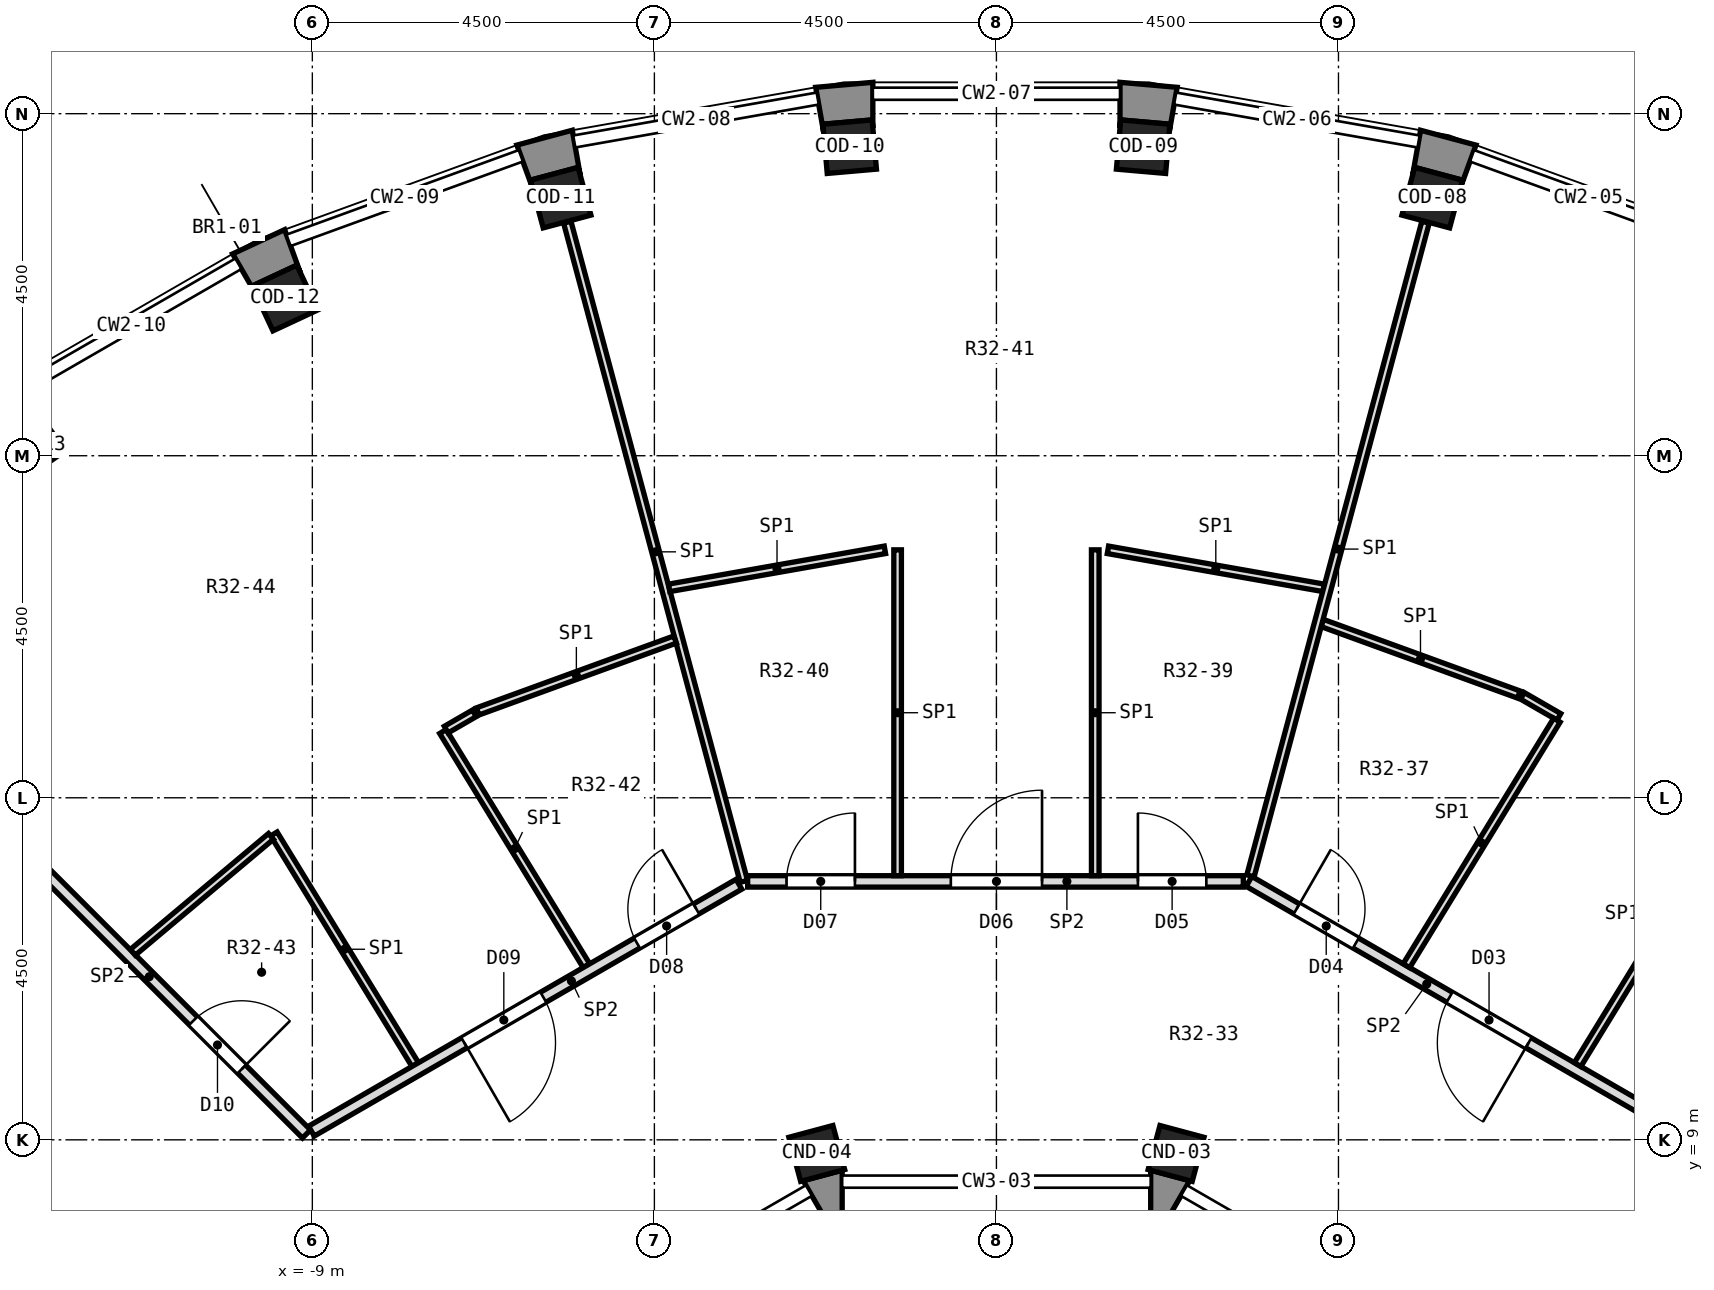
"""IFC4 building model, lengths in metres.
Left out: names, types, materials, properties, quantities, classifications, styles, units other than length and angle.
Written with IfcOpenShell. Run it as: python <this file> out.ifc"""

import sys

from ifc_helpers import new_model, si_unit, direction, frame, frame_2d, origin, origin_2d, place, context, subcontext, project, spatial, polyline, rectangle, outline, extrude, element, fill, save


model = new_model("IFC4")
c1 = context("Model", 3, precision=1e-05, world=origin(), true_north=direction((0.0, 1.0)))
c2 = subcontext(c1, "Body", "Model", "MODEL_VIEW")
j1 = project(units=[si_unit("LENGTHUNIT", "METRE"), si_unit("PLANEANGLEUNIT", "RADIAN")], contexts=[c1])
p1 = place(None, origin())
s1 = spatial("IfcSite", under=j1, at=p1, CompositionType="ELEMENT")
p2 = place(p1, origin())
s2 = spatial("IfcBuilding", under=s1, at=p2, CompositionType="ELEMENT")
p3 = place(p2, frame((0.0, 0.0, 224.7)))
s3 = spatial("IfcBuildingStorey", under=s2, at=p3, CompositionType="ELEMENT", Elevation=224.7)
for number, where, z_axis, x_axis in (
    (1, (5.733, 21.395, -0.55), (0.0, 0.0, 1.0), (0.259, 0.966, 0.0)),
    (2, (1.93, 22.066, -0.55), (0.0, 0.0, 1.0), (0.087, 0.996, 0.0)),
    (3, (-1.93, 22.066, -0.55), (0.0, 0.0, 1.0), (-0.087, 0.996, 0.0)),
    (4, (-5.733, 21.395, -0.55), (0.0, 0.0, 1.0), (-0.259, 0.966, 0.0)),
    (5, (-9.361, 20.075, -0.55), (0.0, 0.0, 1.0), (-0.423, 0.906, 0.0)),
    (6, (-12.705, 18.144, -0.55), (0.0, 0.0, 1.0), (-0.574, 0.819, 0.0)),
):
    element("IfcColumn", number, at=place(p3, frame(where, z_axis=z_axis, x_axis=x_axis)), inside=s3, PredefinedType="COLUMN", context=c2, shape_type="SweptSolid", body=[
        extrude(rectangle(XDim=0.65, YDim=0.65, at=origin_2d()), origin(), (0.0, 0.0, 1.0), 5.55),
    ])
for number, where, z_axis, x_axis in (
    (7, (2.364, 8.821, 0.0), (0.0, 0.0, 1.0), (0.259, 0.966, 0.0)),
    (8, (-2.364, 8.821, 0.0), (0.0, 0.0, 1.0), (-0.259, 0.966, 0.0)),
):
    element("IfcColumn", number, at=place(p3, frame(where, z_axis=z_axis, x_axis=x_axis)), inside=s3, PredefinedType="COLUMN", context=c2, shape_type="SweptSolid", body=[
        extrude(rectangle(XDim=0.6, YDim=0.6, at=origin_2d()), origin(), (0.0, 0.0, 1.0), 5.0),
    ])
p4 = place(p3, origin())
e9 = element("IfcWall", 9, at=p4, inside=s3, PredefinedType="SOLIDWALL", context=c2, shape_type="SweptSolid", body=[
    extrude(outline(polyline([(5.58, 22.282), (5.476, 21.691), (5.503, 21.793), (6.131, 21.625), (6.104, 21.523), (6.309, 22.087), (5.58, 22.282)])), origin(), (0.0, 0.0, 1.0), 4.6),
])
p5 = place(p3, origin())
e10 = element("IfcWall", 10, at=p5, inside=s3, PredefinedType="SOLIDWALL", context=c2, shape_type="SweptSolid", body=[
    extrude(outline(polyline([(2.378, 22.847), (1.626, 22.913), (1.626, 22.312), (1.635, 22.418), (2.283, 22.361), (2.273, 22.256), (2.378, 22.847)])), origin(), (0.0, 0.0, 1.0), 4.6),
])
p6 = place(p3, origin())
e11 = element("IfcWall", 11, at=p6, inside=s3, PredefinedType="SOLIDWALL", context=c2, shape_type="SweptSolid", body=[
    extrude(outline(polyline([(-1.626, 22.913), (-2.378, 22.847), (-2.273, 22.256), (-2.283, 22.361), (-1.635, 22.418), (-1.626, 22.312), (-1.626, 22.913)])), origin(), (0.0, 0.0, 1.0), 4.6),
])
p7 = place(p3, origin())
e12 = element("IfcWall", 12, at=p7, inside=s3, PredefinedType="SOLIDWALL", context=c2, shape_type="SweptSolid", body=[
    extrude(outline(polyline([(-6.309, 22.087), (-6.104, 21.523), (-6.131, 21.625), (-5.503, 21.793), (-5.476, 21.691), (-5.58, 22.282), (-6.309, 22.087)])), origin(), (0.0, 0.0, 1.0), 4.6),
])
p8 = place(p3, origin())
e13 = element("IfcWall", 13, at=p8, inside=s3, PredefinedType="SOLIDWALL", context=c2, shape_type="SweptSolid", body=[
    extrude(outline(polyline([(-9.364, 20.975), (-10.048, 20.656), (-9.748, 20.136), (-9.793, 20.232), (-9.204, 20.507), (-9.159, 20.411), (-9.364, 20.975)])), origin(), (0.0, 0.0, 1.0), 4.6),
])
p9 = place(p3, origin())
e14 = element("IfcWall", 14, at=p9, inside=s3, PredefinedType="SOLIDWALL", context=c2, shape_type="SweptSolid", body=[
    extrude(outline(polyline([(2.029, 8.6), (2.029, 8.0), (2.242, 7.943), (2.542, 8.462), (2.029, 8.6)])), origin(), (0.0, 0.0, 1.0), 4.6),
])
p10 = place(p3, origin())
e15 = element("IfcWall", 15, at=p10, inside=s3, PredefinedType="SOLIDWALL", context=c2, shape_type="SweptSolid", body=[
    extrude(outline(polyline([(-2.542, 8.462), (-2.242, 7.943), (-2.029, 8.0), (-2.029, 8.6), (-2.542, 8.462)])), origin(), (0.0, 0.0, 1.0), 4.6),
])
p11 = place(p3, frame((-5.646, 21.072, 0.0), z_axis=(0.0, 0.0, 1.0), x_axis=(0.258728835498, -0.965949993365, 0.0)))
e16 = element("IfcWall", 16, at=p11, inside=s3, PredefinedType="PARTITIONING", context=c2, shape_type="SweptSolid", body=[
    extrude(rectangle(XDim=8.978, YDim=0.1, at=frame_2d((4.489, 0.0))), origin(), (0.0, 0.0, 1.0), 4.6),
])
p12 = place(p3, frame((-9.506, 13.024, 0.0), z_axis=(0.0, 0.0, 1.0), x_axis=(0.522634449586, -0.852556879103, 0.0)))
e17 = element("IfcWall", 17, at=p12, inside=s3, PredefinedType="PARTITIONING", context=c2, shape_type="SweptSolid", body=[
    extrude(rectangle(XDim=3.559, YDim=0.1, at=frame_2d((1.779, 0.0))), origin(), (0.0, 0.0, 1.0), 4.6),
])
p13 = place(p3, frame((-7.282, 14.372, 0.0), z_axis=(0.0, 0.0, 1.0), x_axis=(0.522422625175, -0.852686695513, 0.0)))
e18 = element("IfcWall", 18, at=p13, inside=s3, PredefinedType="PARTITIONING", context=c2, shape_type="SweptSolid", body=[
    extrude(rectangle(XDim=3.613, YDim=0.1, at=frame_2d((1.807, 0.0))), origin(), (0.0, 0.0, 1.0), 4.6),
])
p14 = place(p3, frame((-13.215, 13.215, 0.0), z_axis=(0.0, 0.0, 1.0), x_axis=(0.707106781187, -0.707106781187, 0.0)))
e19 = element("IfcWall", 19, at=p14, inside=s3, PredefinedType="PARTITIONING", context=c2, shape_type="SweptSolid", body=[
    extrude(rectangle(XDim=5.852, YDim=0.15, at=frame_2d((2.926, 0.0))), origin(), (0.0, 0.0, 1.0), 4.6),
])
p15 = place(p14, frame((3.746, 0.0, 0.0)))
e20 = element("IfcOpeningElement", 20, at=p15, cuts=e19, PredefinedType="OPENING", context=c2, shape_type="SweptSolid", body=[
    extrude(rectangle(XDim=0.9, YDim=2.1, at=frame_2d((0.45, 1.05))), frame((0.0, 0.087, 0.0), z_axis=(0.0, -1.0, 0.0), x_axis=(1.0, 0.0, 0.0)), (0.0, 0.0, 1.0), 0.174),
])
p16 = place(p3, frame((3.323, 12.4, 0.0), z_axis=(0.0, 0.0, 1.0), x_axis=(0.865961614908, -0.500110469302, 0.0)))
e21 = element("IfcWall", 21, at=p16, inside=s3, PredefinedType="PARTITIONING", context=c2, shape_type="SweptSolid", body=[
    extrude(rectangle(XDim=6.645, YDim=0.15, at=frame_2d((3.322, 0.0))), origin(), (0.0, 0.0, 1.0), 4.6),
])
p17 = place(p16, frame((3.047, 0.0, 0.0)))
e22 = element("IfcOpeningElement", 22, at=p17, cuts=e21, PredefinedType="OPENING", context=c2, shape_type="SweptSolid", body=[
    extrude(rectangle(XDim=1.2, YDim=2.1, at=frame_2d((0.6, 1.05))), frame((0.0, 0.087, 0.0), z_axis=(0.0, -1.0, 0.0), x_axis=(1.0, 0.0, 0.0)), (0.0, 0.0, 1.0), 0.174),
])
p18 = place(p16, frame((0.723, 0.0, 0.0)))
e23 = element("IfcOpeningElement", 23, at=p18, cuts=e21, PredefinedType="OPENING", context=c2, shape_type="SweptSolid", body=[
    extrude(rectangle(XDim=0.9, YDim=2.1, at=frame_2d((0.45, 1.05))), frame((0.0, 0.087, 0.0), z_axis=(0.0, -1.0, 0.0), x_axis=(1.0, 0.0, 0.0)), (0.0, 0.0, 1.0), 0.174),
])
p19 = place(p3, frame((6.92, 14.841, 0.0), z_axis=(0.0, 0.0, 1.0), x_axis=(0.866038875684, -0.49997666526, 0.0)))
e24 = element("IfcWall", 24, at=p19, inside=s3, PredefinedType="PARTITIONING", context=c2, shape_type="SweptSolid", body=[
    extrude(rectangle(XDim=0.554, YDim=0.1, at=frame_2d((0.277, 0.0))), origin(), (0.0, 0.0, 1.0), 4.6),
])
p20 = place(p3, frame((4.285, 15.8, 0.0), z_axis=(0.0, 0.0, 1.0), x_axis=(0.93973388068, -0.341906761417, 0.0)))
e25 = element("IfcWall", 25, at=p20, inside=s3, PredefinedType="PARTITIONING", context=c2, shape_type="SweptSolid", body=[
    extrude(rectangle(XDim=2.754, YDim=0.1, at=frame_2d((1.377, 0.0))), origin(), (0.0, 0.0, 1.0), 4.6),
])
p21 = place(p3, frame((1.467, 16.762, 0.0), z_axis=(0.0, 0.0, 1.0), x_axis=(0.984824461094, -0.173553394752, 0.0)))
e26 = element("IfcWall", 26, at=p21, inside=s3, PredefinedType="PARTITIONING", context=c2, shape_type="SweptSolid", body=[
    extrude(rectangle(XDim=2.882, YDim=0.1, at=frame_2d((1.441, 0.0))), origin(), (0.0, 0.0, 1.0), 4.6),
])
p22 = place(p3, frame((-3.273, 12.4, 0.0), z_axis=(0.0, 0.0, 1.0), x_axis=(1.0, 0.0, 0.0)))
e27 = element("IfcWall", 27, at=p22, inside=s3, PredefinedType="PARTITIONING", context=c2, shape_type="SweptSolid", body=[
    extrude(rectangle(XDim=6.521, YDim=0.15, at=frame_2d((3.26, 0.0))), origin(), (0.0, 0.0, 1.0), 4.6),
])
p23 = place(p22, frame((5.135, 0.0, 0.0)))
e28 = element("IfcOpeningElement", 28, at=p23, cuts=e27, PredefinedType="OPENING", context=c2, shape_type="SweptSolid", body=[
    extrude(rectangle(XDim=0.9, YDim=2.1, at=frame_2d((0.45, 1.05))), frame((0.0, 0.087, 0.0), z_axis=(0.0, -1.0, 0.0), x_axis=(1.0, 0.0, 0.0)), (0.0, 0.0, 1.0), 0.174),
])
p24 = place(p22, frame((2.673, 0.0, 0.0)))
e29 = element("IfcOpeningElement", 29, at=p24, cuts=e27, PredefinedType="OPENING", context=c2, shape_type="SweptSolid", body=[
    extrude(rectangle(XDim=1.2, YDim=2.1, at=frame_2d((0.6, 1.05))), frame((0.0, 0.087, 0.0), z_axis=(0.0, -1.0, 0.0), x_axis=(1.0, 0.0, 0.0)), (0.0, 0.0, 1.0), 0.174),
])
p25 = place(p22, frame((0.511, 0.0, 0.0)))
e30 = element("IfcOpeningElement", 30, at=p25, cuts=e27, PredefinedType="OPENING", context=c2, shape_type="SweptSolid", body=[
    extrude(rectangle(XDim=0.9, YDim=2.1, at=frame_2d((0.45, 1.05))), frame((0.0, 0.087, 0.0), z_axis=(0.0, -1.0, 0.0), x_axis=(1.0, 0.0, 0.0)), (0.0, 0.0, 1.0), 0.174),
])
p26 = place(p3, frame((-4.306, 16.262, 0.0), z_axis=(0.0, 0.0, 1.0), x_axis=(0.984827012051, 0.17353891879, 0.0)))
e31 = element("IfcWall", 31, at=p26, inside=s3, PredefinedType="PARTITIONING", context=c2, shape_type="SweptSolid", body=[
    extrude(rectangle(XDim=2.883, YDim=0.1, at=frame_2d((1.441, 0.0))), origin(), (0.0, 0.0, 1.0), 4.6),
])
p27 = place(p3, frame((-6.825, 14.636, 0.0), z_axis=(0.0, 0.0, 1.0), x_axis=(0.939664442714, 0.342097552023, 0.0)))
e32 = element("IfcWall", 32, at=p27, inside=s3, PredefinedType="PARTITIONING", context=c2, shape_type="SweptSolid", body=[
    extrude(rectangle(XDim=2.765, YDim=0.1, at=frame_2d((1.382, 0.0))), origin(), (0.0, 0.0, 1.0), 4.6),
])
p28 = place(p3, frame((-9.012, 9.115, 0.0), z_axis=(0.0, 0.0, 1.0), x_axis=(0.865967095912, 0.5001009786, 0.0)))
e33 = element("IfcWall", 33, at=p28, inside=s3, PredefinedType="PARTITIONING", context=c2, shape_type="SweptSolid", body=[
    extrude(rectangle(XDim=6.495, YDim=0.15, at=frame_2d((3.248, 0.0))), origin(), (0.0, 0.0, 1.0), 4.6),
])
p29 = place(p28, frame((4.947, 0.0, 0.0)))
e34 = element("IfcOpeningElement", 34, at=p29, cuts=e33, PredefinedType="OPENING", context=c2, shape_type="SweptSolid", body=[
    extrude(rectangle(XDim=0.9, YDim=2.1, at=frame_2d((0.45, 1.05))), frame((0.0, 0.087, 0.0), z_axis=(0.0, -1.0, 0.0), x_axis=(1.0, 0.0, 0.0)), (0.0, 0.0, 1.0), 0.174),
])
p30 = place(p28, frame((2.323, 0.0, 0.0)))
e35 = element("IfcOpeningElement", 35, at=p30, cuts=e33, PredefinedType="OPENING", context=c2, shape_type="SweptSolid", body=[
    extrude(rectangle(XDim=1.2, YDim=2.1, at=frame_2d((0.6, 1.05))), frame((0.0, 0.087, 0.0), z_axis=(0.0, -1.0, 0.0), x_axis=(1.0, 0.0, 0.0)), (0.0, 0.0, 1.0), 0.174),
])
p31 = place(p3, frame((-7.239, 14.397, 0.0), z_axis=(0.0, 0.0, 1.0), x_axis=(0.865738694872, 0.500496265921, 0.0)))
e36 = element("IfcWall", 36, at=p31, inside=s3, PredefinedType="PARTITIONING", context=c2, shape_type="SweptSolid", body=[
    extrude(rectangle(XDim=0.428, YDim=0.1, at=frame_2d((0.214, 0.0))), origin(), (0.0, 0.0, 1.0), 4.6),
])
p32 = place(p3, frame((-11.362, 11.467, 0.0), z_axis=(0.0, 0.0, 1.0), x_axis=(0.766108172673, 0.642711652115, 0.0)))
e37 = element("IfcWall", 37, at=p32, inside=s3, PredefinedType="PARTITIONING", context=c2, shape_type="SweptSolid", body=[
    extrude(rectangle(XDim=2.372, YDim=0.1, at=frame_2d((1.186, 0.0))), origin(), (0.0, 0.0, 1.0), 4.6),
])
p33 = place(p3, frame((7.646, 9.99, 0.0), z_axis=(0.0, 0.0, 1.0), x_axis=(0.522631009754, 0.852558987779, 0.0)))
e38 = element("IfcWall", 38, at=p33, inside=s3, PredefinedType="PARTITIONING", context=c2, shape_type="SweptSolid", body=[
    extrude(rectangle(XDim=3.736, YDim=0.1, at=frame_2d((1.868, 0.0))), origin(), (0.0, 0.0, 1.0), 4.6),
])
p34 = place(p3, frame((5.394, 11.291, 0.0), z_axis=(0.0, 0.0, 1.0), x_axis=(0.522471391937, 0.852656815259, 0.0)))
e39 = element("IfcWall", 39, at=p34, inside=s3, PredefinedType="PARTITIONING", context=c2, shape_type="SweptSolid", body=[
    extrude(rectangle(XDim=3.789, YDim=0.1, at=frame_2d((1.895, 0.0))), origin(), (0.0, 0.0, 1.0), 4.6),
])
p35 = place(p3, frame((3.342, 12.472, 0.0), z_axis=(0.0, 0.0, 1.0), x_axis=(0.258684909749, 0.965961757767, 0.0)))
e40 = element("IfcWall", 40, at=p35, inside=s3, PredefinedType="PARTITIONING", context=c2, shape_type="SweptSolid", body=[
    extrude(rectangle(XDim=8.903, YDim=0.1, at=frame_2d((4.451, 0.0))), origin(), (0.0, 0.0, 1.0), 4.6),
])
for number, where, z_axis, x_axis in (
    (41, (1.3, 12.475, 0.0), (0.0, 0.0, 1.0), (0.0, 1.0, 0.0)),
    (42, (-1.3, 12.475, 0.0), (0.0, 0.0, 1.0), (0.0, 1.0, 0.0)),
):
    element("IfcWall", number, at=place(p3, frame(where, z_axis=z_axis, x_axis=x_axis)), inside=s3, PredefinedType="PARTITIONING", context=c2, shape_type="SweptSolid", body=[
        extrude(rectangle(XDim=4.287, YDim=0.1, at=frame_2d((2.144, 0.0))), origin(), (0.0, 0.0, 1.0), 4.6),
    ])
p36 = place(p17, frame((1.2, 0.0, 0.0), z_axis=(0.0, 0.0, 1.0), x_axis=(-1.0, 0.0, 0.0)))
e43 = element("IfcDoor", 43, at=p36, inside=s3, OperationType="SINGLE_SWING_LEFT", PredefinedType="DOOR", context=c2, shape_type="SweptSolid", body=[
    extrude(rectangle(XDim=1.2, YDim=2.1, at=frame_2d((0.6, 1.05))), frame((0.0, 0.025, 0.0), z_axis=(0.0, -1.0, 0.0), x_axis=(1.0, 0.0, 0.0)), (0.0, 0.0, 1.0), 0.05),
])
fill(e22, e43)
p37 = place(p18, origin())
e44 = element("IfcDoor", 44, at=p37, inside=s3, OperationType="SINGLE_SWING_LEFT", PredefinedType="DOOR", context=c2, shape_type="SweptSolid", body=[
    extrude(rectangle(XDim=0.9, YDim=2.1, at=frame_2d((0.45, 1.05))), frame((0.0, 0.025, 0.0), z_axis=(0.0, -1.0, 0.0), x_axis=(1.0, 0.0, 0.0)), (0.0, 0.0, 1.0), 0.05),
])
fill(e23, e44)
p38 = place(p23, origin())
e45 = element("IfcDoor", 45, at=p38, inside=s3, OperationType="SINGLE_SWING_LEFT", PredefinedType="DOOR", context=c2, shape_type="SweptSolid", body=[
    extrude(rectangle(XDim=0.9, YDim=2.1, at=frame_2d((0.45, 1.05))), frame((0.0, 0.025, 0.0), z_axis=(0.0, -1.0, 0.0), x_axis=(1.0, 0.0, 0.0)), (0.0, 0.0, 1.0), 0.05),
])
fill(e28, e45)
p39 = place(p24, origin())
e46 = element("IfcDoor", 46, at=p39, inside=s3, OperationType="SINGLE_SWING_RIGHT", PredefinedType="DOOR", context=c2, shape_type="SweptSolid", body=[
    extrude(rectangle(XDim=1.2, YDim=2.1, at=frame_2d((0.6, 1.05))), frame((0.0, 0.025, 0.0), z_axis=(0.0, -1.0, 0.0), x_axis=(1.0, 0.0, 0.0)), (0.0, 0.0, 1.0), 0.05),
])
fill(e29, e46)
p40 = place(p25, origin())
e47 = element("IfcDoor", 47, at=p40, inside=s3, OperationType="SINGLE_SWING_RIGHT", PredefinedType="DOOR", context=c2, shape_type="SweptSolid", body=[
    extrude(rectangle(XDim=0.9, YDim=2.1, at=frame_2d((0.45, 1.05))), frame((0.0, 0.025, 0.0), z_axis=(0.0, -1.0, 0.0), x_axis=(1.0, 0.0, 0.0)), (0.0, 0.0, 1.0), 0.05),
])
fill(e30, e47)
p41 = place(p29, origin())
e48 = element("IfcDoor", 48, at=p41, inside=s3, OperationType="SINGLE_SWING_RIGHT", PredefinedType="DOOR", context=c2, shape_type="SweptSolid", body=[
    extrude(rectangle(XDim=0.9, YDim=2.1, at=frame_2d((0.45, 1.05))), frame((0.0, 0.025, 0.0), z_axis=(0.0, -1.0, 0.0), x_axis=(1.0, 0.0, 0.0)), (0.0, 0.0, 1.0), 0.05),
])
fill(e34, e48)
p42 = place(p30, frame((1.2, 0.0, 0.0), z_axis=(0.0, 0.0, 1.0), x_axis=(-1.0, 0.0, 0.0)))
e49 = element("IfcDoor", 49, at=p42, inside=s3, OperationType="SINGLE_SWING_RIGHT", PredefinedType="DOOR", context=c2, shape_type="SweptSolid", body=[
    extrude(rectangle(XDim=1.2, YDim=2.1, at=frame_2d((0.6, 1.05))), frame((0.0, 0.025, 0.0), z_axis=(0.0, -1.0, 0.0), x_axis=(1.0, 0.0, 0.0)), (0.0, 0.0, 1.0), 0.05),
])
fill(e35, e49)
p43 = place(p15, origin())
e50 = element("IfcDoor", 50, at=p43, inside=s3, OperationType="SINGLE_SWING_RIGHT", PredefinedType="DOOR", context=c2, shape_type="SweptSolid", body=[
    extrude(rectangle(XDim=0.9, YDim=2.1, at=frame_2d((0.45, 1.05))), frame((0.0, 0.025, 0.0), z_axis=(0.0, -1.0, 0.0), x_axis=(1.0, 0.0, 0.0)), (0.0, 0.0, 1.0), 0.05),
])
fill(e20, e50)
save(model, sys.argv[1])
